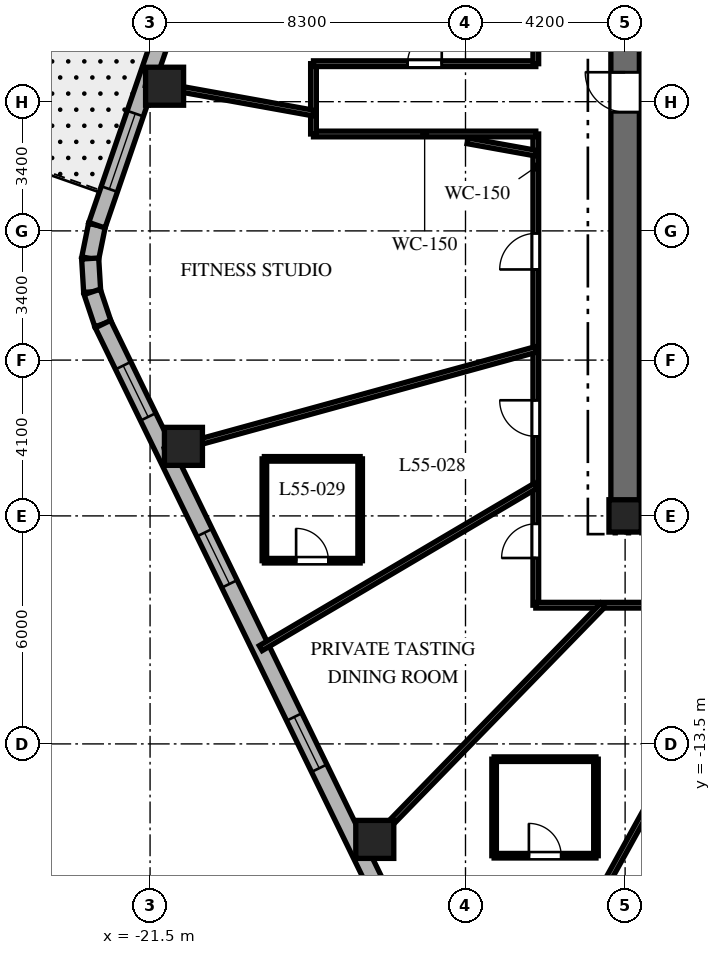
"""IFC4 building model, lengths in metres.
Left out: names, types, materials, properties, quantities, classifications, styles, units other than length and angle.
Written with IfcOpenShell. Run it as: python <this file> out.ifc"""

import sys

from ifc_helpers import new_model, si_unit, direction, frame, frame_2d, origin, origin_2d, place, context, subcontext, project, spatial, rectangle, extrude, element, fill, save


model = new_model("IFC4")
c1 = context("Model", 3, precision=1e-05, world=origin(), true_north=direction((0.0, 1.0)))
c2 = subcontext(c1, "Body", "Model", "MODEL_VIEW")
j1 = project(units=[si_unit("LENGTHUNIT", "METRE"), si_unit("PLANEANGLEUNIT", "RADIAN")], contexts=[c1])
p1 = place(None, origin())
s1 = spatial("IfcSite", under=j1, at=p1, CompositionType="ELEMENT")
p2 = place(p1, origin())
s2 = spatial("IfcBuilding", under=s1, at=p2, CompositionType="ELEMENT")
p3 = place(p2, frame((0.0, 0.0, 221.7)))
s3 = spatial("IfcBuildingStorey", under=s2, at=p3, CompositionType="ELEMENT", Elevation=221.7)
p4 = place(p3, frame((-9.375, -7.5, 0.0), z_axis=(0.0, 0.0, 1.0), x_axis=(1.0, 0.0, 0.0)))
e1 = element("IfcWall", 1, at=p4, inside=s3, PredefinedType="SHEAR", context=c2, shape_type="SweptSolid", body=[
    extrude(rectangle(XDim=18.75, YDim=0.75, at=frame_2d((9.375, 0.0))), origin(), (0.0, 0.0, 1.0), 3.8),
])
p5 = place(p4, frame((9.425, 0.0, 0.0)))
e2 = element("IfcOpeningElement", 2, at=p5, cuts=e1, PredefinedType="OPENING", context=c2, shape_type="SweptSolid", body=[
    extrude(rectangle(XDim=1.0, YDim=2.15, at=frame_2d((0.5, 1.075))), frame((0.0, 0.385, 0.0), z_axis=(0.0, -1.0, 0.0), x_axis=(1.0, 0.0, 0.0)), (0.0, 0.0, 1.0), 0.77),
])
p6 = place(p3, frame((-9.0, -7.125, 0.0), z_axis=(0.0, 0.0, 1.0), x_axis=(0.0, 1.0, 0.0)))
e3 = element("IfcWall", 3, at=p6, inside=s3, PredefinedType="SHEAR", context=c2, shape_type="SweptSolid", body=[
    extrude(rectangle(XDim=14.25, YDim=0.75, at=frame_2d((7.125, 0.0))), origin(), (0.0, 0.0, 1.0), 3.8),
])
p7 = place(p6, frame((10.25, 0.0, 0.0)))
e4 = element("IfcOpeningElement", 4, at=p7, cuts=e3, PredefinedType="OPENING", context=c2, shape_type="SweptSolid", body=[
    extrude(rectangle(XDim=1.05, YDim=2.15, at=frame_2d((0.525, 1.075))), frame((0.0, 0.385, 0.0), z_axis=(0.0, -1.0, 0.0), x_axis=(1.0, 0.0, 0.0)), (0.0, 0.0, 1.0), 0.77),
])
p8 = place(p3, frame((-9.0, -7.5, 0.0), z_axis=(0.0, 0.0, 1.0), x_axis=(1.0, 0.0, 0.0)))
e5 = element("IfcColumn", 5, at=p8, inside=s3, PredefinedType="COLUMN", context=c2, shape_type="SweptSolid", body=[
    extrude(rectangle(XDim=0.85, YDim=0.85, at=origin_2d()), origin(), (0.0, 0.0, 1.0), 3.8),
])
for number, where, z_axis, x_axis in (
    (6, (-21.118, 3.807, 0.0), (0.0, 0.0, 1.0), (1.0, 0.0, 0.0)),
    (7, (-20.622, -5.67, 0.0), (0.0, 0.0, 1.0), (1.0, 0.0, 0.0)),
    (8, (-15.587, -16.013, 0.0), (0.0, 0.0, 1.0), (1.0, 0.0, 0.0)),
):
    element("IfcColumn", number, at=place(p3, frame(where, z_axis=z_axis, x_axis=x_axis)), inside=s3, PredefinedType="COLUMN", context=c2, shape_type="SweptSolid", body=[
        extrude(rectangle(XDim=1.0, YDim=1.0, at=origin_2d()), origin(), (0.0, 0.0, 1.0), 3.8),
    ])
p9 = place(p3, frame((-22.898, 0.15, 0.0), z_axis=(0.0, 0.0, 1.0), x_axis=(-0.199055826889, -0.979988151858, 0.0)))
e9 = element("IfcWall", 9, at=p9, inside=s3, PredefinedType="SOLIDWALL", context=c2, shape_type="SweptSolid", body=[
    extrude(rectangle(XDim=0.894, YDim=0.45, at=frame_2d((0.447, 0.0))), origin(), (0.0, 0.0, 1.0), 3.5),
])
p10 = place(p3, frame((-23.076, -0.727, 0.0), z_axis=(0.0, 0.0, 1.0), x_axis=(0.060805222108, -0.998149650586, 0.0)))
e10 = element("IfcWall", 10, at=p10, inside=s3, PredefinedType="SOLIDWALL", context=c2, shape_type="SweptSolid", body=[
    extrude(rectangle(XDim=0.879, YDim=0.45, at=frame_2d((0.44, 0.0))), origin(), (0.0, 0.0, 1.0), 3.5),
])
p11 = place(p3, frame((-23.023, -1.604, 0.0), z_axis=(0.0, 0.0, 1.0), x_axis=(0.316801227695, -0.948491951537, 0.0)))
e11 = element("IfcWall", 11, at=p11, inside=s3, PredefinedType="SOLIDWALL", context=c2, shape_type="SweptSolid", body=[
    extrude(rectangle(XDim=0.894, YDim=0.45, at=frame_2d((0.447, 0.0))), origin(), (0.0, 0.0, 1.0), 3.5),
])
p12 = place(p3, frame((-16.324, 19.275, 0.0), z_axis=(0.0, 0.0, 1.0), x_axis=(-0.325083142304, -0.945685439557, 0.0)))
e12 = element("IfcWall", 12, at=p12, inside=s3, PredefinedType="SOLIDWALL", context=c2, shape_type="SweptSolid", body=[
    extrude(rectangle(XDim=20.224, YDim=0.45, at=frame_2d((10.112, 0.0))), origin(), (0.0, 0.0, 1.0), 3.5),
])
p13 = place(p12, frame((5.062, 0.0, 0.0)))
e13 = element("IfcOpeningElement", 13, at=p13, cuts=e12, PredefinedType="OPENING", context=c2, shape_type="SweptSolid", body=[
    extrude(rectangle(XDim=1.0, YDim=2.15, at=frame_2d((0.5, 1.075))), frame((0.0, 0.235, 0.0), z_axis=(0.0, -1.0, 0.0), x_axis=(1.0, 0.0, 0.0)), (0.0, 0.0, 1.0), 0.47),
])
p14 = place(p12, frame((0.953, 0.0, 0.8)))
e14 = element("IfcOpeningElement", 14, at=p14, cuts=e12, PredefinedType="OPENING", context=c2, shape_type="SweptSolid", body=[
    extrude(rectangle(XDim=2.1, YDim=1.85, at=frame_2d((1.05, 0.925))), frame((0.0, 0.235, 0.0), z_axis=(0.0, -1.0, 0.0), x_axis=(1.0, 0.0, 0.0)), (0.0, 0.0, 1.0), 0.47),
])
p15 = place(p12, frame((6.629, 0.0, 0.8)))
e15 = element("IfcOpeningElement", 15, at=p15, cuts=e12, PredefinedType="OPENING", context=c2, shape_type="SweptSolid", body=[
    extrude(rectangle(XDim=2.1, YDim=1.85, at=frame_2d((1.05, 0.925))), frame((0.0, 0.235, 0.0), z_axis=(0.0, -1.0, 0.0), x_axis=(1.0, 0.0, 0.0)), (0.0, 0.0, 1.0), 0.47),
])
p16 = place(p12, frame((12.312, 0.0, 0.8)))
e16 = element("IfcOpeningElement", 16, at=p16, cuts=e12, PredefinedType="OPENING", context=c2, shape_type="SweptSolid", body=[
    extrude(rectangle(XDim=2.1, YDim=1.85, at=frame_2d((1.05, 0.925))), frame((0.0, 0.235, 0.0), z_axis=(0.0, -1.0, 0.0), x_axis=(1.0, 0.0, 0.0)), (0.0, 0.0, 1.0), 0.47),
])
p17 = place(p12, frame((17.118, 0.0, 0.8)))
e17 = element("IfcOpeningElement", 17, at=p17, cuts=e12, PredefinedType="OPENING", context=c2, shape_type="SweptSolid", body=[
    extrude(rectangle(XDim=2.1, YDim=1.85, at=frame_2d((1.05, 0.925))), frame((0.0, 0.235, 0.0), z_axis=(0.0, -1.0, 0.0), x_axis=(1.0, 0.0, 0.0)), (0.0, 0.0, 1.0), 0.47),
])
p18 = place(p3, frame((-22.74, -2.452, 0.0), z_axis=(0.0, 0.0, 1.0), x_axis=(0.437753424814, -0.899095066755, 0.0)))
e18 = element("IfcWall", 18, at=p18, inside=s3, PredefinedType="SOLIDWALL", context=c2, shape_type="SweptSolid", body=[
    extrude(rectangle(XDim=19.137, YDim=0.45, at=frame_2d((9.569, 0.0))), origin(), (0.0, 0.0, 1.0), 3.5),
])
p19 = place(p18, frame((1.216, 0.0, 0.8)))
e19 = element("IfcOpeningElement", 19, at=p19, cuts=e18, PredefinedType="OPENING", context=c2, shape_type="SweptSolid", body=[
    extrude(rectangle(XDim=1.5, YDim=1.8, at=frame_2d((0.75, 0.9))), frame((0.0, 0.235, 0.0), z_axis=(0.0, -1.0, 0.0), x_axis=(1.0, 0.0, 0.0)), (0.0, 0.0, 1.0), 0.47),
])
p20 = place(p18, frame((6.105, 0.0, 0.8)))
e20 = element("IfcOpeningElement", 20, at=p20, cuts=e18, PredefinedType="OPENING", context=c2, shape_type="SweptSolid", body=[
    extrude(rectangle(XDim=1.5, YDim=1.8, at=frame_2d((0.75, 0.9))), frame((0.0, 0.235, 0.0), z_axis=(0.0, -1.0, 0.0), x_axis=(1.0, 0.0, 0.0)), (0.0, 0.0, 1.0), 0.47),
])
p21 = place(p18, frame((11.499, 0.0, 0.8)))
e21 = element("IfcOpeningElement", 21, at=p21, cuts=e18, PredefinedType="OPENING", context=c2, shape_type="SweptSolid", body=[
    extrude(rectangle(XDim=1.5, YDim=1.8, at=frame_2d((0.75, 0.9))), frame((0.0, 0.235, 0.0), z_axis=(0.0, -1.0, 0.0), x_axis=(1.0, 0.0, 0.0)), (0.0, 0.0, 1.0), 0.47),
])
p22 = place(p18, frame((16.473, 0.0, 0.8)))
e22 = element("IfcOpeningElement", 22, at=p22, cuts=e18, PredefinedType="OPENING", context=c2, shape_type="SweptSolid", body=[
    extrude(rectangle(XDim=1.5, YDim=1.8, at=frame_2d((0.75, 0.9))), frame((0.0, 0.235, 0.0), z_axis=(0.0, -1.0, 0.0), x_axis=(1.0, 0.0, 0.0)), (0.0, 0.0, 1.0), 0.47),
])
p23 = place(p3, frame((-11.35, -9.85, 0.0), z_axis=(0.0, 0.0, 1.0), x_axis=(0.0, 1.0, 0.0)))
e23 = element("IfcWall", 23, at=p23, inside=s3, PredefinedType="PARTITIONING", context=c2, shape_type="SweptSolid", body=[
    extrude(rectangle(XDim=12.4, YDim=0.15, at=frame_2d((6.2, 0.0))), origin(), (0.0, 0.0, 1.0), 2.99),
])
p24 = place(p23, frame((8.835, 0.0, 0.0)))
e24 = element("IfcOpeningElement", 24, at=p24, cuts=e23, PredefinedType="OPENING", context=c2, shape_type="SweptSolid", body=[
    extrude(rectangle(XDim=0.95, YDim=2.03, at=frame_2d((0.475, 1.015))), frame((0.0, 0.085, 0.0), z_axis=(0.0, -1.0, 0.0), x_axis=(1.0, 0.0, 0.0)), (0.0, 0.0, 1.0), 0.17),
])
p25 = place(p23, frame((4.443, 0.0, 0.0)))
e25 = element("IfcOpeningElement", 25, at=p25, cuts=e23, PredefinedType="OPENING", context=c2, shape_type="SweptSolid", body=[
    extrude(rectangle(XDim=0.95, YDim=2.03, at=frame_2d((0.475, 1.015))), frame((0.0, 0.085, 0.0), z_axis=(0.0, -1.0, 0.0), x_axis=(1.0, 0.0, 0.0)), (0.0, 0.0, 1.0), 0.17),
])
p26 = place(p23, frame((1.242, 0.0, 0.0)))
e26 = element("IfcOpeningElement", 26, at=p26, cuts=e23, PredefinedType="OPENING", context=c2, shape_type="SweptSolid", body=[
    extrude(rectangle(XDim=0.9, YDim=2.03, at=frame_2d((0.45, 1.015))), frame((0.0, 0.085, 0.0), z_axis=(0.0, -1.0, 0.0), x_axis=(1.0, 0.0, 0.0)), (0.0, 0.0, 1.0), 0.17),
])
p27 = place(p3, frame((-11.35, 2.55, 0.0), z_axis=(0.0, 0.0, 1.0), x_axis=(-1.0, 0.0, 0.0)))
e27 = element("IfcWall", 27, at=p27, inside=s3, PredefinedType="PARTITIONING", context=c2, shape_type="SweptSolid", body=[
    extrude(rectangle(XDim=5.85, YDim=0.15, at=frame_2d((2.925, 0.0))), origin(), (0.0, 0.0, 1.0), 2.94),
])
p28 = place(p3, frame((-17.2, 2.55, 0.0), z_axis=(0.0, 0.0, 1.0), x_axis=(0.0, 1.0, 0.0)))
e28 = element("IfcWall", 28, at=p28, inside=s3, PredefinedType="PARTITIONING", context=c2, shape_type="SweptSolid", body=[
    extrude(rectangle(XDim=1.85, YDim=0.15, at=frame_2d((0.925, 0.0))), origin(), (0.0, 0.0, 1.0), 2.94),
])
p29 = place(p3, frame((-17.2, 4.4, 0.0), z_axis=(0.0, 0.0, 1.0), x_axis=(1.0, 0.0, 0.0)))
e29 = element("IfcWall", 29, at=p29, inside=s3, PredefinedType="PARTITIONING", context=c2, shape_type="SweptSolid", body=[
    extrude(rectangle(XDim=5.85, YDim=0.15, at=frame_2d((2.925, 0.0))), origin(), (0.0, 0.0, 1.0), 2.94),
])
p30 = place(p29, frame((2.475, 0.0, 0.0)))
e30 = element("IfcOpeningElement", 30, at=p30, cuts=e29, PredefinedType="OPENING", context=c2, shape_type="SweptSolid", body=[
    extrude(rectangle(XDim=0.9, YDim=2.03, at=frame_2d((0.45, 1.015))), frame((0.0, 0.085, 0.0), z_axis=(0.0, -1.0, 0.0), x_axis=(1.0, 0.0, 0.0)), (0.0, 0.0, 1.0), 0.17),
])
p31 = place(p3, frame((-11.35, 4.4, 0.0), z_axis=(0.0, 0.0, 1.0), x_axis=(0.0, 1.0, 0.0)))
e31 = element("IfcWall", 31, at=p31, inside=s3, PredefinedType="PARTITIONING", context=c2, shape_type="SweptSolid", body=[
    extrude(rectangle(XDim=5.45, YDim=0.15, at=frame_2d((2.725, 0.0))), origin(), (0.0, 0.0, 1.0), 2.99),
])
p32 = place(p31, frame((2.466, 0.0, 0.0)))
e32 = element("IfcOpeningElement", 32, at=p32, cuts=e31, PredefinedType="OPENING", context=c2, shape_type="SweptSolid", body=[
    extrude(rectangle(XDim=0.95, YDim=2.03, at=frame_2d((0.475, 1.015))), frame((0.0, 0.085, 0.0), z_axis=(0.0, -1.0, 0.0), x_axis=(1.0, 0.0, 0.0)), (0.0, 0.0, 1.0), 0.17),
])
p33 = place(p3, frame((-0.92, -9.85, 0.0), z_axis=(0.0, 0.0, 1.0), x_axis=(-1.0, 0.0, 0.0)))
e33 = element("IfcWall", 33, at=p33, inside=s3, PredefinedType="PARTITIONING", context=c2, shape_type="SweptSolid", body=[
    extrude(rectangle(XDim=10.43, YDim=0.15, at=frame_2d((5.215, 0.0))), origin(), (0.0, 0.0, 1.0), 2.99),
])
p34 = place(p33, frame((6.172, 0.0, 0.0)))
e34 = element("IfcOpeningElement", 34, at=p34, cuts=e33, PredefinedType="OPENING", context=c2, shape_type="SweptSolid", body=[
    extrude(rectangle(XDim=0.95, YDim=2.03, at=frame_2d((0.475, 1.015))), frame((0.0, 0.085, 0.0), z_axis=(0.0, -1.0, 0.0), x_axis=(1.0, 0.0, 0.0)), (0.0, 0.0, 1.0), 0.17),
])
p35 = place(p33, frame((2.875, 0.0, 0.0)))
e35 = element("IfcOpeningElement", 35, at=p35, cuts=e33, PredefinedType="OPENING", context=c2, shape_type="SweptSolid", body=[
    extrude(rectangle(XDim=0.9, YDim=2.03, at=frame_2d((0.45, 1.015))), frame((0.0, 0.085, 0.0), z_axis=(0.0, -1.0, 0.0), x_axis=(1.0, 0.0, 0.0)), (0.0, 0.0, 1.0), 0.17),
])
p36 = place(p3, frame((-11.35, 2.046, 0.0), z_axis=(0.0, 0.0, 1.0), x_axis=(-0.984127783205, 0.177461281195, 0.0)))
e36 = element("IfcWall", 36, at=p36, inside=s3, PredefinedType="PARTITIONING", context=c2, shape_type="SweptSolid", body=[
    extrude(rectangle(XDim=1.826, YDim=0.15, at=frame_2d((0.913, 0.0))), origin(), (0.0, 0.0, 1.0), 3.5),
])
p37 = place(p3, frame((-17.2, 3.101, 0.0), z_axis=(0.0, 0.0, 1.0), x_axis=(-0.98413465883, 0.177423147559, 0.0)))
e37 = element("IfcWall", 37, at=p37, inside=s3, PredefinedType="PARTITIONING", context=c2, shape_type="SweptSolid", body=[
    extrude(rectangle(XDim=4.482, YDim=0.15, at=frame_2d((2.241, 0.0))), origin(), (0.0, 0.0, 1.0), 2.74),
])
p38 = place(p3, frame((-11.35, -3.121, 0.0), z_axis=(0.0, 0.0, 1.0), x_axis=(-0.964212793822, -0.265129568758, 0.0)))
e38 = element("IfcWall", 38, at=p38, inside=s3, PredefinedType="PARTITIONING", context=c2, shape_type="SweptSolid", body=[
    extrude(rectangle(XDim=10.12, YDim=0.15, at=frame_2d((5.06, 0.0))), origin(), (0.0, 0.0, 1.0), 2.74),
])
p39 = place(p3, frame((-11.35, -6.705, 0.0), z_axis=(0.0, 0.0, 1.0), x_axis=(-0.86097625004, -0.508645158108, 0.0)))
e39 = element("IfcWall", 39, at=p39, inside=s3, PredefinedType="PARTITIONING", context=c2, shape_type="SweptSolid", body=[
    extrude(rectangle(XDim=8.406, YDim=0.15, at=frame_2d((4.203, 0.0))), origin(), (0.0, 0.0, 1.0), 2.74),
])
p40 = place(p3, frame((-9.588, -9.85, 0.0), z_axis=(0.0, 0.0, 1.0), x_axis=(-0.697519469595, -0.716565830567, 0.0)))
e40 = element("IfcWall", 40, at=p40, inside=s3, PredefinedType="PARTITIONING", context=c2, shape_type="SweptSolid", body=[
    extrude(rectangle(XDim=9.126, YDim=0.15, at=frame_2d((4.563, 0.0))), origin(), (0.0, 0.0, 1.0), 2.74),
])
p41 = place(p3, frame((-5.451, -9.85, 0.0), z_axis=(0.0, 0.0, 1.0), x_axis=(-0.484188830955, -0.87496352837, 0.0)))
e41 = element("IfcWall", 41, at=p41, inside=s3, PredefinedType="PARTITIONING", context=c2, shape_type="SweptSolid", body=[
    extrude(rectangle(XDim=13.107, YDim=0.15, at=frame_2d((6.553, 0.0))), origin(), (0.0, 0.0, 1.0), 2.74),
])
p42 = place(p3, frame((-18.492, -8.679, 0.0), z_axis=(0.0, 0.0, 1.0), x_axis=(1.0, 0.0, 0.0)))
e42 = element("IfcWall", 42, at=p42, inside=s3, PredefinedType="PARTITIONING", context=c2, shape_type="SweptSolid", body=[
    extrude(rectangle(XDim=2.52, YDim=0.12, at=frame_2d((1.26, 0.0))), origin(), (0.0, 0.0, 1.0), 3.5),
])
p43 = place(p42, frame((0.835, 0.0, 0.0)))
e43 = element("IfcOpeningElement", 43, at=p43, cuts=e42, PredefinedType="OPENING", context=c2, shape_type="SweptSolid", body=[
    extrude(rectangle(XDim=0.85, YDim=2.03, at=frame_2d((0.425, 1.015))), frame((0.0, 0.07, 0.0), z_axis=(0.0, -1.0, 0.0), x_axis=(1.0, 0.0, 0.0)), (0.0, 0.0, 1.0), 0.14),
])
p44 = place(p3, frame((-15.972, -8.679, 0.0), z_axis=(0.0, 0.0, 1.0), x_axis=(0.0, 1.0, 0.0)))
e44 = element("IfcWall", 44, at=p44, inside=s3, PredefinedType="PARTITIONING", context=c2, shape_type="SweptSolid", body=[
    extrude(rectangle(XDim=2.68, YDim=0.12, at=frame_2d((1.34, 0.0))), origin(), (0.0, 0.0, 1.0), 2.99),
])
p45 = place(p3, frame((-15.972, -5.999, 0.0), z_axis=(0.0, 0.0, 1.0), x_axis=(-1.0, 0.0, 0.0)))
e45 = element("IfcWall", 45, at=p45, inside=s3, PredefinedType="PARTITIONING", context=c2, shape_type="SweptSolid", body=[
    extrude(rectangle(XDim=2.52, YDim=0.12, at=frame_2d((1.26, 0.0))), origin(), (0.0, 0.0, 1.0), 2.94),
])
p46 = place(p3, frame((-18.492, -5.999, 0.0), z_axis=(0.0, 0.0, 1.0), x_axis=(0.0, -1.0, 0.0)))
e46 = element("IfcWall", 46, at=p46, inside=s3, PredefinedType="PARTITIONING", context=c2, shape_type="SweptSolid", body=[
    extrude(rectangle(XDim=2.68, YDim=0.12, at=frame_2d((1.34, 0.0))), origin(), (0.0, 0.0, 1.0), 2.99),
])
p47 = place(p3, frame((-12.447, -16.442, 0.0), z_axis=(0.0, 0.0, 1.0), x_axis=(1.0, 0.0, 0.0)))
e47 = element("IfcWall", 47, at=p47, inside=s3, PredefinedType="PARTITIONING", context=c2, shape_type="SweptSolid", body=[
    extrude(rectangle(XDim=2.68, YDim=0.12, at=frame_2d((1.34, 0.0))), origin(), (0.0, 0.0, 1.0), 3.5),
])
p48 = place(p47, frame((0.915, 0.0, 0.0)))
e48 = element("IfcOpeningElement", 48, at=p48, cuts=e47, PredefinedType="OPENING", context=c2, shape_type="SweptSolid", body=[
    extrude(rectangle(XDim=0.85, YDim=2.03, at=frame_2d((0.425, 1.015))), frame((0.0, 0.07, 0.0), z_axis=(0.0, -1.0, 0.0), x_axis=(1.0, 0.0, 0.0)), (0.0, 0.0, 1.0), 0.14),
])
p49 = place(p3, frame((-9.767, -16.442, 0.0), z_axis=(0.0, 0.0, 1.0), x_axis=(0.0, 1.0, 0.0)))
e49 = element("IfcWall", 49, at=p49, inside=s3, PredefinedType="PARTITIONING", context=c2, shape_type="SweptSolid", body=[
    extrude(rectangle(XDim=2.54, YDim=0.12, at=frame_2d((1.27, 0.0))), origin(), (0.0, 0.0, 1.0), 3.073),
])
p50 = place(p3, frame((-9.767, -13.902, 0.0), z_axis=(0.0, 0.0, 1.0), x_axis=(-1.0, 0.0, 0.0)))
e50 = element("IfcWall", 50, at=p50, inside=s3, PredefinedType="PARTITIONING", context=c2, shape_type="SweptSolid", body=[
    extrude(rectangle(XDim=2.68, YDim=0.12, at=frame_2d((1.34, 0.0))), origin(), (0.0, 0.0, 1.0), 3.073),
])
p51 = place(p3, frame((-12.447, -13.902, 0.0), z_axis=(0.0, 0.0, 1.0), x_axis=(0.0, -1.0, 0.0)))
e51 = element("IfcWall", 51, at=p51, inside=s3, PredefinedType="PARTITIONING", context=c2, shape_type="SweptSolid", body=[
    extrude(rectangle(XDim=2.54, YDim=0.12, at=frame_2d((1.27, 0.0))), origin(), (0.0, 0.0, 1.0), 3.5),
])
p52 = place(p17, origin())
e52 = element("IfcWindow", 52, at=p52, inside=s3, PartitioningType="SINGLE_PANEL", PredefinedType="WINDOW", context=c2, shape_type="SweptSolid", body=[
    extrude(rectangle(XDim=2.1, YDim=1.85, at=frame_2d((1.05, 0.925))), frame((0.0, 0.03, 0.0), z_axis=(0.0, -1.0, 0.0), x_axis=(1.0, 0.0, 0.0)), (0.0, 0.0, 1.0), 0.06),
])
fill(e17, e52)
p53 = place(p19, origin())
e53 = element("IfcWindow", 53, at=p53, inside=s3, PartitioningType="SINGLE_PANEL", PredefinedType="WINDOW", context=c2, shape_type="SweptSolid", body=[
    extrude(rectangle(XDim=1.5, YDim=1.8, at=frame_2d((0.75, 0.9))), frame((0.0, 0.03, 0.0), z_axis=(0.0, -1.0, 0.0), x_axis=(1.0, 0.0, 0.0)), (0.0, 0.0, 1.0), 0.06),
])
fill(e19, e53)
p54 = place(p20, origin())
e54 = element("IfcWindow", 54, at=p54, inside=s3, PartitioningType="SINGLE_PANEL", PredefinedType="WINDOW", context=c2, shape_type="SweptSolid", body=[
    extrude(rectangle(XDim=1.5, YDim=1.8, at=frame_2d((0.75, 0.9))), frame((0.0, 0.03, 0.0), z_axis=(0.0, -1.0, 0.0), x_axis=(1.0, 0.0, 0.0)), (0.0, 0.0, 1.0), 0.06),
])
fill(e20, e54)
p55 = place(p21, origin())
e55 = element("IfcWindow", 55, at=p55, inside=s3, PartitioningType="SINGLE_PANEL", PredefinedType="WINDOW", context=c2, shape_type="SweptSolid", body=[
    extrude(rectangle(XDim=1.5, YDim=1.8, at=frame_2d((0.75, 0.9))), frame((0.0, 0.03, 0.0), z_axis=(0.0, -1.0, 0.0), x_axis=(1.0, 0.0, 0.0)), (0.0, 0.0, 1.0), 0.06),
])
fill(e21, e55)
p56 = place(p7, origin())
e56 = element("IfcDoor", 56, at=p56, inside=s3, OperationType="SINGLE_SWING_RIGHT", PredefinedType="DOOR", context=c2, shape_type="SweptSolid", body=[
    extrude(rectangle(XDim=1.05, YDim=2.15, at=frame_2d((0.525, 1.075))), frame((0.0, 0.025, 0.0), z_axis=(0.0, -1.0, 0.0), x_axis=(1.0, 0.0, 0.0)), (0.0, 0.0, 1.0), 0.05),
])
fill(e4, e56)
p57 = place(p30, origin())
e57 = element("IfcDoor", 57, at=p57, inside=s3, OperationType="SINGLE_SWING_RIGHT", PredefinedType="DOOR", context=c2, shape_type="SweptSolid", body=[
    extrude(rectangle(XDim=0.9, YDim=2.03, at=frame_2d((0.45, 1.015))), frame((0.0, 0.025, 0.0), z_axis=(0.0, -1.0, 0.0), x_axis=(1.0, 0.0, 0.0)), (0.0, 0.0, 1.0), 0.05),
])
fill(e30, e57)
p58 = place(p24, origin())
e58 = element("IfcDoor", 58, at=p58, inside=s3, OperationType="SINGLE_SWING_LEFT", PredefinedType="DOOR", context=c2, shape_type="SweptSolid", body=[
    extrude(rectangle(XDim=0.95, YDim=2.03, at=frame_2d((0.475, 1.015))), frame((0.0, 0.025, 0.0), z_axis=(0.0, -1.0, 0.0), x_axis=(1.0, 0.0, 0.0)), (0.0, 0.0, 1.0), 0.05),
])
fill(e24, e58)
p59 = place(p25, origin())
e59 = element("IfcDoor", 59, at=p59, inside=s3, OperationType="SINGLE_SWING_RIGHT", PredefinedType="DOOR", context=c2, shape_type="SweptSolid", body=[
    extrude(rectangle(XDim=0.95, YDim=2.03, at=frame_2d((0.475, 1.015))), frame((0.0, 0.025, 0.0), z_axis=(0.0, -1.0, 0.0), x_axis=(1.0, 0.0, 0.0)), (0.0, 0.0, 1.0), 0.05),
])
fill(e25, e59)
p60 = place(p43, origin())
e60 = element("IfcDoor", 60, at=p60, inside=s3, OperationType="SINGLE_SWING_LEFT", PredefinedType="DOOR", context=c2, shape_type="SweptSolid", body=[
    extrude(rectangle(XDim=0.85, YDim=2.03, at=frame_2d((0.425, 1.015))), frame((0.0, 0.025, 0.0), z_axis=(0.0, -1.0, 0.0), x_axis=(1.0, 0.0, 0.0)), (0.0, 0.0, 1.0), 0.05),
])
fill(e43, e60)
p61 = place(p26, origin())
e61 = element("IfcDoor", 61, at=p61, inside=s3, OperationType="SINGLE_SWING_LEFT", PredefinedType="DOOR", context=c2, shape_type="SweptSolid", body=[
    extrude(rectangle(XDim=0.9, YDim=2.03, at=frame_2d((0.45, 1.015))), frame((0.0, 0.025, 0.0), z_axis=(0.0, -1.0, 0.0), x_axis=(1.0, 0.0, 0.0)), (0.0, 0.0, 1.0), 0.05),
])
fill(e26, e61)
p62 = place(p48, origin())
e62 = element("IfcDoor", 62, at=p62, inside=s3, OperationType="SINGLE_SWING_LEFT", PredefinedType="DOOR", context=c2, shape_type="SweptSolid", body=[
    extrude(rectangle(XDim=0.85, YDim=2.03, at=frame_2d((0.425, 1.015))), frame((0.0, 0.025, 0.0), z_axis=(0.0, -1.0, 0.0), x_axis=(1.0, 0.0, 0.0)), (0.0, 0.0, 1.0), 0.05),
])
fill(e48, e62)
save(model, sys.argv[1])
